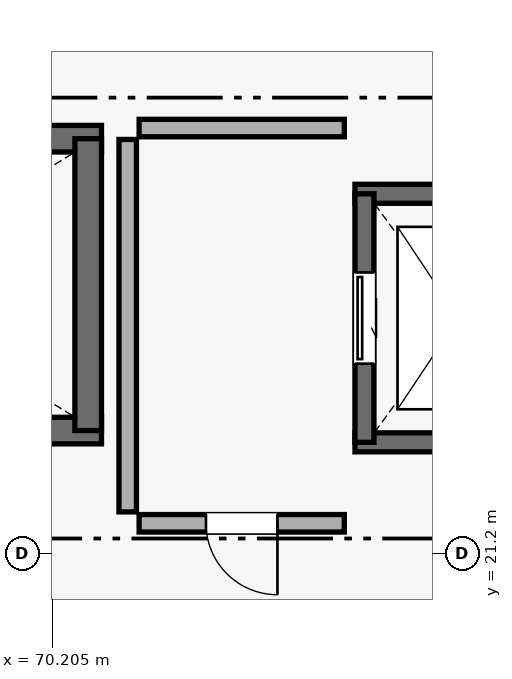
"""IFC4 building model, lengths in metres.
Left out: names, types, materials, properties, quantities, classifications, styles, units other than length and angle.
Written with IfcOpenShell. Run it as: python <this file> out.ifc"""

import sys

from ifc_helpers import new_model, si_unit, direction, frame, frame_2d, origin, place, context, subcontext, project, spatial, rectangle, extrude, element, fill, save


model = new_model("IFC4")
c1 = context("Model", 3, precision=1e-05, world=origin(), true_north=direction((0.0, 1.0)))
c2 = subcontext(c1, "Body", "Model", "MODEL_VIEW")
j1 = project(units=[si_unit("LENGTHUNIT", "METRE"), si_unit("PLANEANGLEUNIT", "RADIAN")], contexts=[c1])
p1 = place(None, origin())
s1 = spatial("IfcSite", under=j1, at=p1, CompositionType="ELEMENT")
p2 = place(p1, origin())
s2 = spatial("IfcBuilding", under=s1, at=p2, CompositionType="ELEMENT")
p3 = place(p2, frame((0.0, 0.0, 33.3)))
s3 = spatial("IfcBuildingStorey", under=s2, at=p3, CompositionType="ELEMENT", Elevation=33.3)
for number, where, z_axis, x_axis in (
    (1, (70.855, 22.82, 0.0), (0.0, 0.0, 1.0), (-1.0, 0.0, 0.0)),
    (2, (62.845, 26.66, 0.0), (0.0, 0.0, 1.0), (1.0, 0.0, 0.0)),
):
    element("IfcWall", number, at=place(p3, frame(where, z_axis=z_axis, x_axis=x_axis)), inside=s3, PredefinedType="SHEAR", context=c2, shape_type="SweptSolid", body=[
        extrude(rectangle(XDim=8.01, YDim=0.35, at=frame_2d((4.005, 0.0))), origin(), (0.0, 0.0, 1.0), 4.05),
    ])
p4 = place(p3, frame((70.68, 26.66, 0.0), z_axis=(0.0, 0.0, 1.0), x_axis=(0.0, -1.0, 0.0)))
e3 = element("IfcWall", 3, at=p4, inside=s3, PredefinedType="SHEAR", context=c2, shape_type="SweptSolid", body=[
    extrude(rectangle(XDim=3.84, YDim=0.35, at=frame_2d((1.92, 0.0))), origin(), (0.0, 0.0, 1.0), 4.05),
])
for number, where, z_axis, x_axis in (
    (4, (76.91, 22.665, 0.0), (0.0, 0.0, 1.0), (-1.0, 0.0, 0.0)),
    (5, (74.19, 25.935, 0.0), (0.0, 0.0, 1.0), (1.0, 0.0, 0.0)),
):
    element("IfcWall", number, at=place(p3, frame(where, z_axis=z_axis, x_axis=x_axis)), inside=s3, PredefinedType="SHEAR", context=c2, shape_type="SweptSolid", body=[
        extrude(rectangle(XDim=2.72, YDim=0.25, at=frame_2d((1.36, 0.0))), origin(), (0.0, 0.0, 1.0), 4.05),
    ])
p5 = place(p3, frame((74.315, 22.665, 0.0), z_axis=(0.0, 0.0, 1.0), x_axis=(0.0, 1.0, 0.0)))
e6 = element("IfcWall", 6, at=p5, inside=s3, PredefinedType="SHEAR", context=c2, shape_type="SweptSolid", body=[
    extrude(rectangle(XDim=3.27, YDim=0.25, at=frame_2d((1.635, 0.0))), origin(), (0.0, 0.0, 1.0), 4.05),
])
p6 = place(p5, frame((1.035, 0.0, 0.0)))
e7 = element("IfcOpeningElement", 7, at=p6, cuts=e6, PredefinedType="OPENING", context=c2, shape_type="SweptSolid", body=[
    extrude(rectangle(XDim=1.2, YDim=2.25, at=frame_2d((0.6, 1.125))), frame((0.0, 0.135, 0.0), z_axis=(0.0, -1.0, 0.0), x_axis=(1.0, 0.0, 0.0)), (0.0, 0.0, 1.0), 0.27),
])
p7 = place(p3, frame((74.05, 21.6, 0.0), z_axis=(0.0, 0.0, 1.0), x_axis=(-1.0, 0.0, 0.0)))
e8 = element("IfcWall", 8, at=p7, inside=s3, PredefinedType="PARTITIONING", context=c2, shape_type="SweptSolid", body=[
    extrude(rectangle(XDim=2.7, YDim=0.23, at=frame_2d((1.35, 0.0))), origin(), (0.0, 0.0, 1.0), 2.8),
])
p8 = place(p7, frame((0.88, 0.0, 0.0)))
e9 = element("IfcOpeningElement", 9, at=p8, cuts=e8, PredefinedType="OPENING", context=c2, shape_type="SweptSolid", body=[
    extrude(rectangle(XDim=0.94, YDim=2.18, at=frame_2d((0.47, 1.09))), frame((0.0, 0.125, 0.0), z_axis=(0.0, -1.0, 0.0), x_axis=(1.0, 0.0, 0.0)), (0.0, 0.0, 1.0), 0.25),
])
p9 = place(p3, frame((71.35, 26.8, 0.0), z_axis=(0.0, 0.0, 1.0), x_axis=(1.0, 0.0, 0.0)))
e10 = element("IfcWall", 10, at=p9, inside=s3, PredefinedType="PARTITIONING", context=c2, shape_type="SweptSolid", body=[
    extrude(rectangle(XDim=2.7, YDim=0.23, at=frame_2d((1.35, 0.0))), origin(), (0.0, 0.0, 1.0), 2.8),
])
p10 = place(p3, frame((71.2, 21.75, 0.0), z_axis=(0.0, 0.0, 1.0), x_axis=(0.0, 1.0, 0.0)))
e11 = element("IfcWall", 11, at=p10, inside=s3, PredefinedType="PARTITIONING", context=c2, shape_type="SweptSolid", body=[
    extrude(rectangle(XDim=4.9, YDim=0.23, at=frame_2d((2.45, 0.0))), origin(), (0.0, 0.0, 1.0), 2.8),
])
p11 = place(p6, origin())
e12 = element("IfcDoor", 12, at=p11, inside=s3, OperationType="SLIDING_TO_LEFT", PredefinedType="DOOR", context=c2, shape_type="SweptSolid", body=[
    extrude(rectangle(XDim=1.2, YDim=2.25, at=frame_2d((0.6, 1.125))), frame((0.0, 0.025, 0.0), z_axis=(0.0, -1.0, 0.0), x_axis=(1.0, 0.0, 0.0)), (0.0, 0.0, 1.0), 0.05),
])
fill(e7, e12)
p12 = place(p8, origin())
e13 = element("IfcDoor", 13, at=p12, inside=s3, OperationType="SINGLE_SWING_LEFT", PredefinedType="DOOR", context=c2, shape_type="SweptSolid", body=[
    extrude(rectangle(XDim=0.94, YDim=2.18, at=frame_2d((0.47, 1.09))), frame((0.0, 0.025, 0.0), z_axis=(0.0, -1.0, 0.0), x_axis=(1.0, 0.0, 0.0)), (0.0, 0.0, 1.0), 0.05),
])
fill(e9, e13)
save(model, sys.argv[1])
